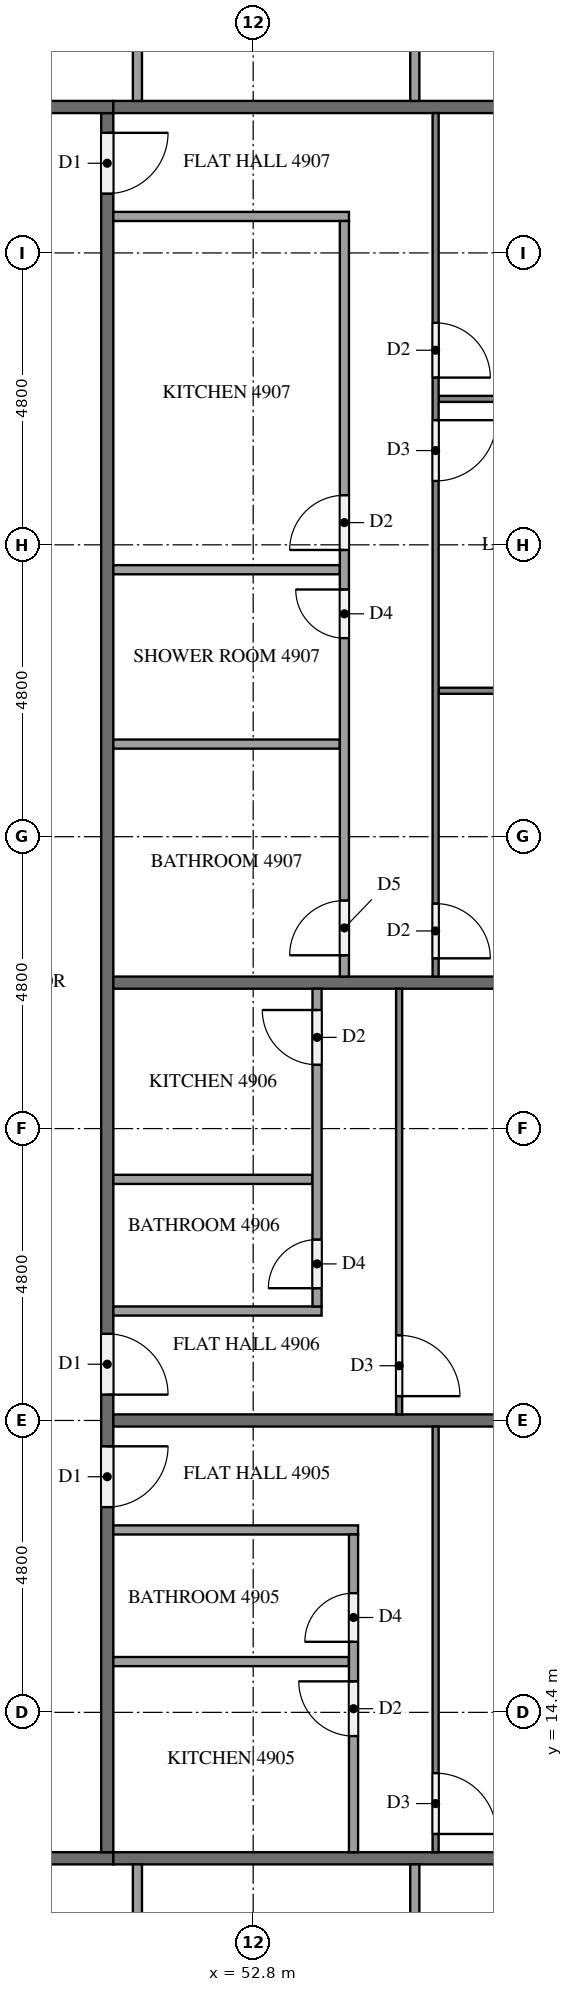
"""IFC4 building model, lengths in metres.
Left out: names, types, materials, properties, quantities, classifications, styles, units other than length and angle.
Written with IfcOpenShell. Run it as: python <this file> out.ifc"""

import sys

from ifc_helpers import new_model, si_unit, direction, frame, frame_2d, origin, place, context, subcontext, project, spatial, rectangle, extrude, element, fill, save


model = new_model("IFC4")
c1 = context("Model", 3, precision=1e-05, world=origin(), true_north=direction((0.0, 1.0)))
c2 = subcontext(c1, "Body", "Model", "MODEL_VIEW")
j1 = project(units=[si_unit("LENGTHUNIT", "METRE"), si_unit("PLANEANGLEUNIT", "RADIAN")], contexts=[c1])
p1 = place(None, origin())
s1 = spatial("IfcSite", under=j1, at=p1, CompositionType="ELEMENT")
p2 = place(p1, origin())
s2 = spatial("IfcBuilding", under=s1, at=p2, CompositionType="ELEMENT")
p3 = place(p2, frame((0.0, 0.0, 189.4)))
s3 = spatial("IfcBuildingStorey", under=s2, at=p3, CompositionType="ELEMENT", Elevation=189.4)
p4 = place(p3, frame((50.5, 12.0, 0.0), z_axis=(0.0, 0.0, 1.0), x_axis=(-1.0, 0.0, 0.0)))
e1 = element("IfcWall", 1, at=p4, inside=s3, PredefinedType="PARTITIONING", context=c2, shape_type="SweptSolid", body=[
    extrude(rectangle(XDim=38.6, YDim=0.2, at=frame_2d((19.3, 0.0))), origin(), (0.0, 0.0, 1.0), 3.2),
])
p5 = place(p4, frame((31.725, 0.0, 0.0)))
e2 = element("IfcOpeningElement", 2, at=p5, cuts=e1, PredefinedType="OPENING", context=c2, shape_type="SweptSolid", body=[
    extrude(rectangle(XDim=1.0, YDim=2.1, at=frame_2d((0.5, 1.05))), frame((0.0, 0.11, 0.0), z_axis=(0.0, -1.0, 0.0), x_axis=(1.0, 0.0, 0.0)), (0.0, 0.0, 1.0), 0.22),
])
p6 = place(p4, frame((19.725, 0.0, 0.0)))
e3 = element("IfcOpeningElement", 3, at=p6, cuts=e1, PredefinedType="OPENING", context=c2, shape_type="SweptSolid", body=[
    extrude(rectangle(XDim=1.0, YDim=2.1, at=frame_2d((0.5, 1.05))), frame((0.0, 0.11, 0.0), z_axis=(0.0, -1.0, 0.0), x_axis=(1.0, 0.0, 0.0)), (0.0, 0.0, 1.0), 0.22),
])
p7 = place(p4, frame((17.875, 0.0, 0.0)))
e4 = element("IfcOpeningElement", 4, at=p7, cuts=e1, PredefinedType="OPENING", context=c2, shape_type="SweptSolid", body=[
    extrude(rectangle(XDim=1.0, YDim=2.1, at=frame_2d((0.5, 1.05))), frame((0.0, 0.11, 0.0), z_axis=(0.0, -1.0, 0.0), x_axis=(1.0, 0.0, 0.0)), (0.0, 0.0, 1.0), 0.22),
])
p8 = place(p4, frame((3.475, 0.0, 0.0)))
e5 = element("IfcOpeningElement", 5, at=p8, cuts=e1, PredefinedType="OPENING", context=c2, shape_type="SweptSolid", body=[
    extrude(rectangle(XDim=1.0, YDim=2.1, at=frame_2d((0.5, 1.05))), frame((0.0, 0.11, 0.0), z_axis=(0.0, -1.0, 0.0), x_axis=(1.0, 0.0, 0.0)), (0.0, 0.0, 1.0), 0.22),
])
p9 = place(p3, frame((50.4, 40.7, 0.0), z_axis=(0.0, 0.0, 1.0), x_axis=(0.0, -1.0, 0.0)))
e6 = element("IfcWall", 6, at=p9, inside=s3, PredefinedType="PARTITIONING", context=c2, shape_type="SweptSolid", body=[
    extrude(rectangle(XDim=28.6, YDim=0.2, at=frame_2d((14.3, 0.0))), origin(), (0.0, 0.0, 1.0), 3.2),
])
p10 = place(p9, frame((21.925, 0.0, 0.0)))
e7 = element("IfcOpeningElement", 7, at=p10, cuts=e6, PredefinedType="OPENING", context=c2, shape_type="SweptSolid", body=[
    extrude(rectangle(XDim=1.0, YDim=2.1, at=frame_2d((0.5, 1.05))), frame((0.0, 0.11, 0.0), z_axis=(0.0, -1.0, 0.0), x_axis=(1.0, 0.0, 0.0)), (0.0, 0.0, 1.0), 0.22),
])
p11 = place(p9, frame((20.075, 0.0, 0.0)))
e8 = element("IfcOpeningElement", 8, at=p11, cuts=e6, PredefinedType="OPENING", context=c2, shape_type="SweptSolid", body=[
    extrude(rectangle(XDim=1.0, YDim=2.1, at=frame_2d((0.5, 1.05))), frame((0.0, 0.11, 0.0), z_axis=(0.0, -1.0, 0.0), x_axis=(1.0, 0.0, 0.0)), (0.0, 0.0, 1.0), 0.22),
])
p12 = place(p9, frame((0.325, 0.0, 0.0)))
e9 = element("IfcOpeningElement", 9, at=p12, cuts=e6, PredefinedType="OPENING", context=c2, shape_type="SweptSolid", body=[
    extrude(rectangle(XDim=1.0, YDim=2.1, at=frame_2d((0.5, 1.05))), frame((0.0, 0.11, 0.0), z_axis=(0.0, -1.0, 0.0), x_axis=(1.0, 0.0, 0.0)), (0.0, 0.0, 1.0), 0.22),
])
p13 = place(p3, frame((11.9, 40.8, 0.0), z_axis=(0.0, 0.0, 1.0), x_axis=(1.0, 0.0, 0.0)))
e10 = element("IfcWall", 10, at=p13, inside=s3, PredefinedType="PARTITIONING", context=c2, shape_type="SweptSolid", body=[
    extrude(rectangle(XDim=38.6, YDim=0.2, at=frame_2d((19.3, 0.0))), origin(), (0.0, 0.0, 1.0), 3.2),
])
p14 = place(p13, frame((34.125, 0.0, 0.0)))
e11 = element("IfcOpeningElement", 11, at=p14, cuts=e10, PredefinedType="OPENING", context=c2, shape_type="SweptSolid", body=[
    extrude(rectangle(XDim=1.0, YDim=2.1, at=frame_2d((0.5, 1.05))), frame((0.0, 0.11, 0.0), z_axis=(0.0, -1.0, 0.0), x_axis=(1.0, 0.0, 0.0)), (0.0, 0.0, 1.0), 0.22),
])
p15 = place(p13, frame((24.525, 0.0, 0.0)))
e12 = element("IfcOpeningElement", 12, at=p15, cuts=e10, PredefinedType="OPENING", context=c2, shape_type="SweptSolid", body=[
    extrude(rectangle(XDim=1.0, YDim=2.1, at=frame_2d((0.5, 1.05))), frame((0.0, 0.11, 0.0), z_axis=(0.0, -1.0, 0.0), x_axis=(1.0, 0.0, 0.0)), (0.0, 0.0, 1.0), 0.22),
])
p16 = place(p13, frame((7.725, 0.0, 0.0)))
e13 = element("IfcOpeningElement", 13, at=p16, cuts=e10, PredefinedType="OPENING", context=c2, shape_type="SweptSolid", body=[
    extrude(rectangle(XDim=1.0, YDim=2.1, at=frame_2d((0.5, 1.05))), frame((0.0, 0.11, 0.0), z_axis=(0.0, -1.0, 0.0), x_axis=(1.0, 0.0, 0.0)), (0.0, 0.0, 1.0), 0.22),
])
p17 = place(p13, frame((5.875, 0.0, 0.0)))
e14 = element("IfcOpeningElement", 14, at=p17, cuts=e10, PredefinedType="OPENING", context=c2, shape_type="SweptSolid", body=[
    extrude(rectangle(XDim=1.0, YDim=2.1, at=frame_2d((0.5, 1.05))), frame((0.0, 0.11, 0.0), z_axis=(0.0, -1.0, 0.0), x_axis=(1.0, 0.0, 0.0)), (0.0, 0.0, 1.0), 0.22),
])
for number, where, z_axis, x_axis in (
    (15, (50.5, 12.0, 0.0), (0.0, 0.0, 1.0), (1.0, 0.0, 0.0)),
    (16, (50.5, 19.2, 0.0), (0.0, 0.0, 1.0), (1.0, 0.0, 0.0)),
    (17, (50.5, 26.4, 0.0), (0.0, 0.0, 1.0), (1.0, 0.0, 0.0)),
    (18, (50.5, 40.8, 0.0), (0.0, 0.0, 1.0), (1.0, 0.0, 0.0)),
):
    element("IfcWall", number, at=place(p3, frame(where, z_axis=z_axis, x_axis=x_axis)), inside=s3, PredefinedType="PARTITIONING", context=c2, shape_type="SweptSolid", body=[
        extrude(rectangle(XDim=11.8, YDim=0.2, at=frame_2d((5.9, 0.0))), origin(), (0.0, 0.0, 1.0), 3.2),
    ])
for number, where, z_axis, x_axis in (
    (19, (50.896, 11.9, 0.0), (0.0, 0.0, 1.0), (0.0, -1.0, 0.0)),
    (20, (55.458, 11.9, 0.0), (0.0, 0.0, 1.0), (0.0, -1.0, 0.0)),
):
    element("IfcWall", number, at=place(p3, frame(where, z_axis=z_axis, x_axis=x_axis)), inside=s3, PredefinedType="PARTITIONING", context=c2, shape_type="SweptSolid", body=[
        extrude(rectangle(XDim=4.175, YDim=0.15, at=frame_2d((2.087, 0.0))), origin(), (0.0, 0.0, 1.0), 3.2),
    ])
p18 = place(p3, frame((55.8, 19.1, 0.0), z_axis=(0.0, 0.0, 1.0), x_axis=(0.0, -1.0, 0.0)))
e21 = element("IfcWall", 21, at=p18, inside=s3, PredefinedType="PARTITIONING", context=c2, shape_type="SweptSolid", body=[
    extrude(rectangle(XDim=7.0, YDim=0.1, at=frame_2d((3.5, 0.0))), origin(), (0.0, 0.0, 1.0), 3.2),
])
p19 = place(p18, frame((5.7, 0.0, 0.0)))
e22 = element("IfcOpeningElement", 22, at=p19, cuts=e21, PredefinedType="OPENING", context=c2, shape_type="SweptSolid", body=[
    extrude(rectangle(XDim=1.0, YDim=2.1, at=frame_2d((0.5, 1.05))), frame((0.0, 0.06, 0.0), z_axis=(0.0, -1.0, 0.0), x_axis=(1.0, 0.0, 0.0)), (0.0, 0.0, 1.0), 0.12),
])
p20 = place(p3, frame((50.5, 15.235, 0.0), z_axis=(0.0, 0.0, 1.0), x_axis=(1.0, 0.0, 0.0)))
e23 = element("IfcWall", 23, at=p20, inside=s3, PredefinedType="PARTITIONING", context=c2, shape_type="SweptSolid", body=[
    extrude(rectangle(XDim=3.875, YDim=0.15, at=frame_2d((1.938, 0.0))), origin(), (0.0, 0.0, 1.0), 3.2),
])
p21 = place(p3, frame((50.5, 17.4, 0.0), z_axis=(0.0, 0.0, 1.0), x_axis=(1.0, 0.0, 0.0)))
e24 = element("IfcWall", 24, at=p21, inside=s3, PredefinedType="PARTITIONING", context=c2, shape_type="SweptSolid", body=[
    extrude(rectangle(XDim=4.025, YDim=0.15, at=frame_2d((2.012, 0.0))), origin(), (0.0, 0.0, 1.0), 3.2),
])
p22 = place(p3, frame((54.45, 12.1, 0.0), z_axis=(0.0, 0.0, 1.0), x_axis=(0.0, 1.0, 0.0)))
e25 = element("IfcWall", 25, at=p22, inside=s3, PredefinedType="PARTITIONING", context=c2, shape_type="SweptSolid", body=[
    extrude(rectangle(XDim=5.225, YDim=0.15, at=frame_2d((2.612, 0.0))), origin(), (0.0, 0.0, 1.0), 3.2),
])
p23 = place(p22, frame((3.46, 0.0, 0.0)))
e26 = element("IfcOpeningElement", 26, at=p23, cuts=e25, PredefinedType="OPENING", context=c2, shape_type="SweptSolid", body=[
    extrude(rectangle(XDim=0.8, YDim=2.1, at=frame_2d((0.4, 1.05))), frame((0.0, 0.085, 0.0), z_axis=(0.0, -1.0, 0.0), x_axis=(1.0, 0.0, 0.0)), (0.0, 0.0, 1.0), 0.17),
])
p24 = place(p22, frame((1.91, 0.0, 0.0)))
e27 = element("IfcOpeningElement", 27, at=p24, cuts=e25, PredefinedType="OPENING", context=c2, shape_type="SweptSolid", body=[
    extrude(rectangle(XDim=0.9, YDim=2.1, at=frame_2d((0.45, 1.05))), frame((0.0, 0.085, 0.0), z_axis=(0.0, -1.0, 0.0), x_axis=(1.0, 0.0, 0.0)), (0.0, 0.0, 1.0), 0.17),
])
p25 = place(p3, frame((55.2, 26.3, 0.0), z_axis=(0.0, 0.0, 1.0), x_axis=(0.0, -1.0, 0.0)))
e28 = element("IfcWall", 28, at=p25, inside=s3, PredefinedType="PARTITIONING", context=c2, shape_type="SweptSolid", body=[
    extrude(rectangle(XDim=7.0, YDim=0.1, at=frame_2d((3.5, 0.0))), origin(), (0.0, 0.0, 1.0), 3.2),
])
p26 = place(p25, frame((5.7, 0.0, 0.0)))
e29 = element("IfcOpeningElement", 29, at=p26, cuts=e28, PredefinedType="OPENING", context=c2, shape_type="SweptSolid", body=[
    extrude(rectangle(XDim=1.0, YDim=2.1, at=frame_2d((0.5, 1.05))), frame((0.0, 0.06, 0.0), z_axis=(0.0, -1.0, 0.0), x_axis=(1.0, 0.0, 0.0)), (0.0, 0.0, 1.0), 0.12),
])
p27 = place(p3, frame((50.5, 23.165, 0.0), z_axis=(0.0, 0.0, 1.0), x_axis=(1.0, 0.0, 0.0)))
e30 = element("IfcWall", 30, at=p27, inside=s3, PredefinedType="PARTITIONING", context=c2, shape_type="SweptSolid", body=[
    extrude(rectangle(XDim=3.275, YDim=0.15, at=frame_2d((1.637, 0.0))), origin(), (0.0, 0.0, 1.0), 3.2),
])
p28 = place(p3, frame((50.5, 21.0, 0.0), z_axis=(0.0, 0.0, 1.0), x_axis=(1.0, 0.0, 0.0)))
e31 = element("IfcWall", 31, at=p28, inside=s3, PredefinedType="PARTITIONING", context=c2, shape_type="SweptSolid", body=[
    extrude(rectangle(XDim=3.425, YDim=0.15, at=frame_2d((1.712, 0.0))), origin(), (0.0, 0.0, 1.0), 3.2),
])
p29 = place(p3, frame((53.85, 21.075, 0.0), z_axis=(0.0, 0.0, 1.0), x_axis=(0.0, 1.0, 0.0)))
e32 = element("IfcWall", 32, at=p29, inside=s3, PredefinedType="PARTITIONING", context=c2, shape_type="SweptSolid", body=[
    extrude(rectangle(XDim=5.225, YDim=0.15, at=frame_2d((2.613, 0.0))), origin(), (0.0, 0.0, 1.0), 3.2),
])
p30 = place(p29, frame((0.3, 0.0, 0.0)))
e33 = element("IfcOpeningElement", 33, at=p30, cuts=e32, PredefinedType="OPENING", context=c2, shape_type="SweptSolid", body=[
    extrude(rectangle(XDim=0.8, YDim=2.1, at=frame_2d((0.4, 1.05))), frame((0.0, 0.085, 0.0), z_axis=(0.0, -1.0, 0.0), x_axis=(1.0, 0.0, 0.0)), (0.0, 0.0, 1.0), 0.17),
])
p31 = place(p29, frame((3.975, 0.0, 0.0)))
e34 = element("IfcOpeningElement", 34, at=p31, cuts=e32, PredefinedType="OPENING", context=c2, shape_type="SweptSolid", body=[
    extrude(rectangle(XDim=0.9, YDim=2.1, at=frame_2d((0.45, 1.05))), frame((0.0, 0.085, 0.0), z_axis=(0.0, -1.0, 0.0), x_axis=(1.0, 0.0, 0.0)), (0.0, 0.0, 1.0), 0.17),
])
for number, where, z_axis, x_axis in (
    (35, (55.85, 36.0, 0.0), (0.0, 0.0, 1.0), (1.0, 0.0, 0.0)),
    (36, (55.85, 31.2, 0.0), (0.0, 0.0, 1.0), (1.0, 0.0, 0.0)),
):
    element("IfcWall", number, at=place(p3, frame(where, z_axis=z_axis, x_axis=x_axis)), inside=s3, PredefinedType="PARTITIONING", context=c2, shape_type="SweptSolid", body=[
        extrude(rectangle(XDim=6.45, YDim=0.1, at=frame_2d((3.225, 0.0))), origin(), (0.0, 0.0, 1.0), 3.2),
    ])
p32 = place(p3, frame((55.8, 40.7, 0.0), z_axis=(0.0, 0.0, 1.0), x_axis=(0.0, -1.0, 0.0)))
e37 = element("IfcWall", 37, at=p32, inside=s3, PredefinedType="PARTITIONING", context=c2, shape_type="SweptSolid", body=[
    extrude(rectangle(XDim=14.2, YDim=0.1, at=frame_2d((7.1, 0.0))), origin(), (0.0, 0.0, 1.0), 3.2),
])
p33 = place(p32, frame((3.45, 0.0, 0.0)))
e38 = element("IfcOpeningElement", 38, at=p33, cuts=e37, PredefinedType="OPENING", context=c2, shape_type="SweptSolid", body=[
    extrude(rectangle(XDim=0.9, YDim=2.1, at=frame_2d((0.45, 1.05))), frame((0.0, 0.06, 0.0), z_axis=(0.0, -1.0, 0.0), x_axis=(1.0, 0.0, 0.0)), (0.0, 0.0, 1.0), 0.12),
])
p34 = place(p32, frame((5.05, 0.0, 0.0)))
e39 = element("IfcOpeningElement", 39, at=p34, cuts=e37, PredefinedType="OPENING", context=c2, shape_type="SweptSolid", body=[
    extrude(rectangle(XDim=1.0, YDim=2.1, at=frame_2d((0.5, 1.05))), frame((0.0, 0.06, 0.0), z_axis=(0.0, -1.0, 0.0), x_axis=(1.0, 0.0, 0.0)), (0.0, 0.0, 1.0), 0.12),
])
p35 = place(p32, frame((13.0, 0.0, 0.0)))
e40 = element("IfcOpeningElement", 40, at=p35, cuts=e37, PredefinedType="OPENING", context=c2, shape_type="SweptSolid", body=[
    extrude(rectangle(XDim=0.9, YDim=2.1, at=frame_2d((0.45, 1.05))), frame((0.0, 0.06, 0.0), z_axis=(0.0, -1.0, 0.0), x_axis=(1.0, 0.0, 0.0)), (0.0, 0.0, 1.0), 0.12),
])
for number, where, z_axis, x_axis in (
    (41, (50.5, 33.19, 0.0), (0.0, 0.0, 1.0), (1.0, 0.0, 0.0)),
    (42, (50.5, 30.323, 0.0), (0.0, 0.0, 1.0), (1.0, 0.0, 0.0)),
):
    element("IfcWall", number, at=place(p3, frame(where, z_axis=z_axis, x_axis=x_axis)), inside=s3, PredefinedType="PARTITIONING", context=c2, shape_type="SweptSolid", body=[
        extrude(rectangle(XDim=3.725, YDim=0.15, at=frame_2d((1.863, 0.0))), origin(), (0.0, 0.0, 1.0), 3.2),
    ])
p36 = place(p3, frame((50.5, 39.0, 0.0), z_axis=(0.0, 0.0, 1.0), x_axis=(1.0, 0.0, 0.0)))
e43 = element("IfcWall", 43, at=p36, inside=s3, PredefinedType="PARTITIONING", context=c2, shape_type="SweptSolid", body=[
    extrude(rectangle(XDim=3.875, YDim=0.15, at=frame_2d((1.938, 0.0))), origin(), (0.0, 0.0, 1.0), 3.2),
])
p37 = place(p3, frame((54.3, 26.5, 0.0), z_axis=(0.0, 0.0, 1.0), x_axis=(0.0, 1.0, 0.0)))
e44 = element("IfcWall", 44, at=p37, inside=s3, PredefinedType="PARTITIONING", context=c2, shape_type="SweptSolid", body=[
    extrude(rectangle(XDim=12.425, YDim=0.15, at=frame_2d((6.212, 0.0))), origin(), (0.0, 0.0, 1.0), 3.2),
])
p38 = place(p37, frame((7.015, 0.0, 0.0)))
e45 = element("IfcOpeningElement", 45, at=p38, cuts=e44, PredefinedType="OPENING", context=c2, shape_type="SweptSolid", body=[
    extrude(rectangle(XDim=0.9, YDim=2.1, at=frame_2d((0.45, 1.05))), frame((0.0, 0.085, 0.0), z_axis=(0.0, -1.0, 0.0), x_axis=(1.0, 0.0, 0.0)), (0.0, 0.0, 1.0), 0.17),
])
p39 = place(p37, frame((5.565, 0.0, 0.0)))
e46 = element("IfcOpeningElement", 46, at=p39, cuts=e44, PredefinedType="OPENING", context=c2, shape_type="SweptSolid", body=[
    extrude(rectangle(XDim=0.8, YDim=2.1, at=frame_2d((0.4, 1.05))), frame((0.0, 0.085, 0.0), z_axis=(0.0, -1.0, 0.0), x_axis=(1.0, 0.0, 0.0)), (0.0, 0.0, 1.0), 0.17),
])
p40 = place(p37, frame((0.35, 0.0, 0.0)))
e47 = element("IfcOpeningElement", 47, at=p40, cuts=e44, PredefinedType="OPENING", context=c2, shape_type="SweptSolid", body=[
    extrude(rectangle(XDim=0.9, YDim=2.1, at=frame_2d((0.45, 1.05))), frame((0.0, 0.085, 0.0), z_axis=(0.0, -1.0, 0.0), x_axis=(1.0, 0.0, 0.0)), (0.0, 0.0, 1.0), 0.17),
])
for number, where, z_axis, x_axis in (
    (48, (50.896, 40.9, 0.0), (0.0, 0.0, 1.0), (0.0, 1.0, 0.0)),
    (49, (55.458, 40.9, 0.0), (0.0, 0.0, 1.0), (0.0, 1.0, 0.0)),
):
    element("IfcWall", number, at=place(p3, frame(where, z_axis=z_axis, x_axis=x_axis)), inside=s3, PredefinedType="PARTITIONING", context=c2, shape_type="SweptSolid", body=[
        extrude(rectangle(XDim=1.925, YDim=0.15, at=frame_2d((0.962, 0.0))), origin(), (0.0, 0.0, 1.0), 3.2),
    ])
p41 = place(p10, origin())
e50 = element("IfcDoor", 50, at=p41, inside=s3, OperationType="SINGLE_SWING_LEFT", PredefinedType="DOOR", context=c2, shape_type="SweptSolid", body=[
    extrude(rectangle(XDim=1.0, YDim=2.1, at=frame_2d((0.5, 1.05))), frame((0.0, 0.025, 0.0), z_axis=(0.0, -1.0, 0.0), x_axis=(1.0, 0.0, 0.0)), (0.0, 0.0, 1.0), 0.05),
])
fill(e7, e50)
p42 = place(p11, origin())
e51 = element("IfcDoor", 51, at=p42, inside=s3, OperationType="SINGLE_SWING_RIGHT", PredefinedType="DOOR", context=c2, shape_type="SweptSolid", body=[
    extrude(rectangle(XDim=1.0, YDim=2.1, at=frame_2d((0.5, 1.05))), frame((0.0, 0.025, 0.0), z_axis=(0.0, -1.0, 0.0), x_axis=(1.0, 0.0, 0.0)), (0.0, 0.0, 1.0), 0.05),
])
fill(e8, e51)
p43 = place(p12, origin())
e52 = element("IfcDoor", 52, at=p43, inside=s3, OperationType="SINGLE_SWING_LEFT", PredefinedType="DOOR", context=c2, shape_type="SweptSolid", body=[
    extrude(rectangle(XDim=1.0, YDim=2.1, at=frame_2d((0.5, 1.05))), frame((0.0, 0.025, 0.0), z_axis=(0.0, -1.0, 0.0), x_axis=(1.0, 0.0, 0.0)), (0.0, 0.0, 1.0), 0.05),
])
fill(e9, e52)
p44 = place(p19, origin())
e53 = element("IfcDoor", 53, at=p44, inside=s3, OperationType="SINGLE_SWING_RIGHT", PredefinedType="DOOR", context=c2, shape_type="SweptSolid", body=[
    extrude(rectangle(XDim=1.0, YDim=2.1, at=frame_2d((0.5, 1.05))), frame((0.0, 0.025, 0.0), z_axis=(0.0, -1.0, 0.0), x_axis=(1.0, 0.0, 0.0)), (0.0, 0.0, 1.0), 0.05),
])
fill(e22, e53)
p45 = place(p23, origin())
e54 = element("IfcDoor", 54, at=p45, inside=s3, OperationType="SINGLE_SWING_LEFT", PredefinedType="DOOR", context=c2, shape_type="SweptSolid", body=[
    extrude(rectangle(XDim=0.8, YDim=2.1, at=frame_2d((0.4, 1.05))), frame((0.0, 0.025, 0.0), z_axis=(0.0, -1.0, 0.0), x_axis=(1.0, 0.0, 0.0)), (0.0, 0.0, 1.0), 0.05),
])
fill(e26, e54)
p46 = place(p24, origin())
e55 = element("IfcDoor", 55, at=p46, inside=s3, OperationType="SINGLE_SWING_RIGHT", PredefinedType="DOOR", context=c2, shape_type="SweptSolid", body=[
    extrude(rectangle(XDim=0.9, YDim=2.1, at=frame_2d((0.45, 1.05))), frame((0.0, 0.025, 0.0), z_axis=(0.0, -1.0, 0.0), x_axis=(1.0, 0.0, 0.0)), (0.0, 0.0, 1.0), 0.05),
])
fill(e27, e55)
p47 = place(p26, origin())
e56 = element("IfcDoor", 56, at=p47, inside=s3, OperationType="SINGLE_SWING_RIGHT", PredefinedType="DOOR", context=c2, shape_type="SweptSolid", body=[
    extrude(rectangle(XDim=1.0, YDim=2.1, at=frame_2d((0.5, 1.05))), frame((0.0, 0.025, 0.0), z_axis=(0.0, -1.0, 0.0), x_axis=(1.0, 0.0, 0.0)), (0.0, 0.0, 1.0), 0.05),
])
fill(e29, e56)
p48 = place(p30, origin())
e57 = element("IfcDoor", 57, at=p48, inside=s3, OperationType="SINGLE_SWING_LEFT", PredefinedType="DOOR", context=c2, shape_type="SweptSolid", body=[
    extrude(rectangle(XDim=0.8, YDim=2.1, at=frame_2d((0.4, 1.05))), frame((0.0, 0.025, 0.0), z_axis=(0.0, -1.0, 0.0), x_axis=(1.0, 0.0, 0.0)), (0.0, 0.0, 1.0), 0.05),
])
fill(e33, e57)
p49 = place(p31, origin())
e58 = element("IfcDoor", 58, at=p49, inside=s3, OperationType="SINGLE_SWING_RIGHT", PredefinedType="DOOR", context=c2, shape_type="SweptSolid", body=[
    extrude(rectangle(XDim=0.9, YDim=2.1, at=frame_2d((0.45, 1.05))), frame((0.0, 0.025, 0.0), z_axis=(0.0, -1.0, 0.0), x_axis=(1.0, 0.0, 0.0)), (0.0, 0.0, 1.0), 0.05),
])
fill(e34, e58)
p50 = place(p33, origin())
e59 = element("IfcDoor", 59, at=p50, inside=s3, OperationType="SINGLE_SWING_RIGHT", PredefinedType="DOOR", context=c2, shape_type="SweptSolid", body=[
    extrude(rectangle(XDim=0.9, YDim=2.1, at=frame_2d((0.45, 1.05))), frame((0.0, 0.025, 0.0), z_axis=(0.0, -1.0, 0.0), x_axis=(1.0, 0.0, 0.0)), (0.0, 0.0, 1.0), 0.05),
])
fill(e38, e59)
p51 = place(p34, origin())
e60 = element("IfcDoor", 60, at=p51, inside=s3, OperationType="SINGLE_SWING_LEFT", PredefinedType="DOOR", context=c2, shape_type="SweptSolid", body=[
    extrude(rectangle(XDim=1.0, YDim=2.1, at=frame_2d((0.5, 1.05))), frame((0.0, 0.025, 0.0), z_axis=(0.0, -1.0, 0.0), x_axis=(1.0, 0.0, 0.0)), (0.0, 0.0, 1.0), 0.05),
])
fill(e39, e60)
p52 = place(p35, origin())
e61 = element("IfcDoor", 61, at=p52, inside=s3, OperationType="SINGLE_SWING_RIGHT", PredefinedType="DOOR", context=c2, shape_type="SweptSolid", body=[
    extrude(rectangle(XDim=0.9, YDim=2.1, at=frame_2d((0.45, 1.05))), frame((0.0, 0.025, 0.0), z_axis=(0.0, -1.0, 0.0), x_axis=(1.0, 0.0, 0.0)), (0.0, 0.0, 1.0), 0.05),
])
fill(e40, e61)
p53 = place(p38, origin())
e62 = element("IfcDoor", 62, at=p53, inside=s3, OperationType="SINGLE_SWING_LEFT", PredefinedType="DOOR", context=c2, shape_type="SweptSolid", body=[
    extrude(rectangle(XDim=0.9, YDim=2.1, at=frame_2d((0.45, 1.05))), frame((0.0, 0.025, 0.0), z_axis=(0.0, -1.0, 0.0), x_axis=(1.0, 0.0, 0.0)), (0.0, 0.0, 1.0), 0.05),
])
fill(e45, e62)
p54 = place(p39, origin())
e63 = element("IfcDoor", 63, at=p54, inside=s3, OperationType="SINGLE_SWING_RIGHT", PredefinedType="DOOR", context=c2, shape_type="SweptSolid", body=[
    extrude(rectangle(XDim=0.8, YDim=2.1, at=frame_2d((0.4, 1.05))), frame((0.0, 0.025, 0.0), z_axis=(0.0, -1.0, 0.0), x_axis=(1.0, 0.0, 0.0)), (0.0, 0.0, 1.0), 0.05),
])
fill(e46, e63)
p55 = place(p40, origin())
e64 = element("IfcDoor", 64, at=p55, inside=s3, OperationType="SINGLE_SWING_LEFT", PredefinedType="DOOR", context=c2, shape_type="SweptSolid", body=[
    extrude(rectangle(XDim=0.9, YDim=2.1, at=frame_2d((0.45, 1.05))), frame((0.0, 0.025, 0.0), z_axis=(0.0, -1.0, 0.0), x_axis=(1.0, 0.0, 0.0)), (0.0, 0.0, 1.0), 0.05),
])
fill(e47, e64)
save(model, sys.argv[1])
